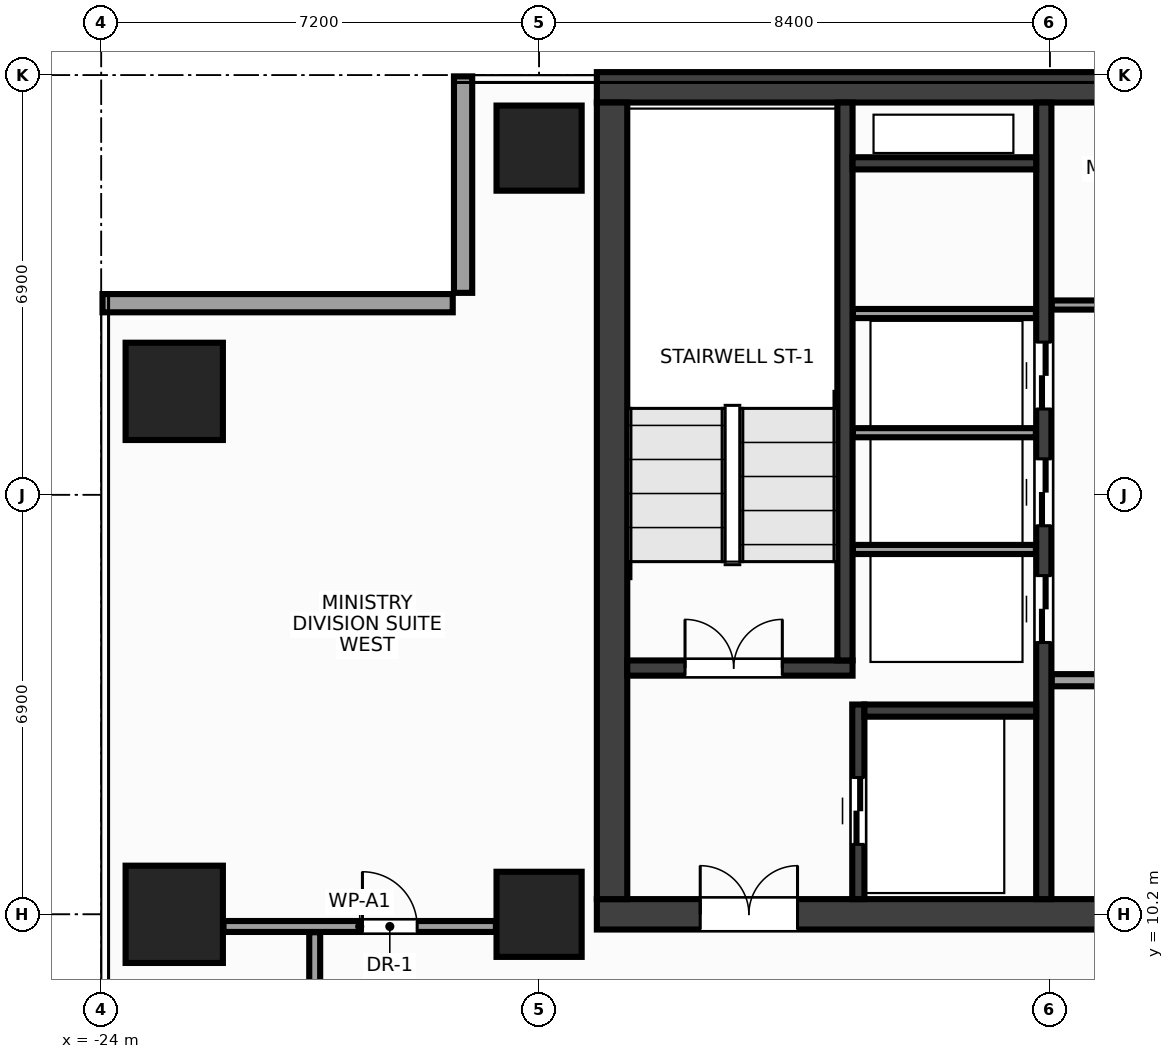
"""IFC4 building model, lengths in metres.
Left out: names, types, materials, properties, quantities, classifications, styles, units other than length and angle.
Written with IfcOpenShell. Run it as: python <this file> out.ifc"""

import sys

from ifc_helpers import new_model, si_unit, direction, frame, frame_2d, origin, origin_2d, place, context, subcontext, project, spatial, rectangle, extrude, source, transform, mapped, element, fill, save


model = new_model("IFC4")
c1 = context("Model", 3, precision=1e-05, world=origin(), true_north=direction((0.0, 1.0)))
c2 = subcontext(c1, "Body", "Model", "MODEL_VIEW")
j1 = project(units=[si_unit("LENGTHUNIT", "METRE"), si_unit("PLANEANGLEUNIT", "RADIAN")], contexts=[c1])
p1 = place(None, origin())
s1 = spatial("IfcSite", under=j1, at=p1, CompositionType="ELEMENT")
p2 = place(p1, origin())
s2 = spatial("IfcBuilding", under=s1, at=p2, CompositionType="ELEMENT")
p3 = place(p2, frame((0.0, 0.0, 225.2)))
s3 = spatial("IfcBuildingStorey", under=s2, at=p3, CompositionType="ELEMENT", Elevation=225.2)
m1 = source(origin(), c2, "Body", "SweptSolid", [
    extrude(rectangle(XDim=31.7, YDim=0.5, at=frame_2d((15.85, 0.0))), origin(), (0.0, 0.0, 1.0), 3.6),
])
p4 = place(p3, frame((-15.85, 23.8, 0.0), z_axis=(0.0, 0.0, 1.0), x_axis=(1.0, 0.0, 0.0)))
e1 = element("IfcWall", 1, at=p4, inside=s3, PredefinedType="SHEAR", context=c2, shape_type="MappedRepresentation", body=[
    mapped(m1, transform((0.0, 0.0, 0.0), x_axis=(1.0, 0.0, 0.0), y_axis=(0.0, 1.0, 0.0), z_axis=(0.0, 0.0, 1.0), scale=1.0)),
])
p5 = place(p3, frame((-15.85, 10.2, 0.0), z_axis=(0.0, 0.0, 1.0), x_axis=(1.0, 0.0, 0.0)))
e2 = element("IfcWall", 2, at=p5, inside=s3, PredefinedType="SHEAR", context=c2, shape_type="MappedRepresentation", body=[
    mapped(m1, transform((0.0, 0.0, 0.0), x_axis=(1.0, 0.0, 0.0), y_axis=(0.0, 1.0, 0.0), z_axis=(0.0, 0.0, 1.0), scale=1.0)),
])
p6 = place(p5, frame((1.7, 0.0, 0.0)))
e3 = element("IfcOpeningElement", 3, at=p6, cuts=e2, PredefinedType="OPENING", context=c2, shape_type="SweptSolid", body=[
    extrude(rectangle(XDim=1.6, YDim=2.15, at=frame_2d((0.8, 1.075))), frame((0.0, 0.262, 0.0), z_axis=(0.0, -1.0, 0.0), x_axis=(1.0, 0.0, 0.0)), (0.0, 0.0, 1.0), 0.524),
])
p7 = place(p5, frame((28.4, 0.0, 0.0)))
e4 = element("IfcOpeningElement", 4, at=p7, cuts=e2, PredefinedType="OPENING", context=c2, shape_type="SweptSolid", body=[
    extrude(rectangle(XDim=1.6, YDim=2.15, at=frame_2d((0.8, 1.075))), frame((0.0, 0.262, 0.0), z_axis=(0.0, -1.0, 0.0), x_axis=(1.0, 0.0, 0.0)), (0.0, 0.0, 1.0), 0.524),
])
p8 = place(p5, frame((15.1, 0.0, 0.0)))
e5 = element("IfcOpeningElement", 5, at=p8, cuts=e2, PredefinedType="OPENING", context=c2, shape_type="SweptSolid", body=[
    extrude(rectangle(XDim=1.5, YDim=2.2, at=frame_2d((0.75, 1.1))), frame((0.0, 0.262, 0.0), z_axis=(0.0, -1.0, 0.0), x_axis=(1.0, 0.0, 0.0)), (0.0, 0.0, 1.0), 0.524),
])
m2 = source(origin(), c2, "Body", "SweptSolid", [
    extrude(rectangle(XDim=13.1, YDim=0.5, at=frame_2d((6.55, 0.0))), origin(), (0.0, 0.0, 1.0), 3.6),
])
p9 = place(p3, frame((-15.6, 10.45, 0.0), z_axis=(0.0, 0.0, 1.0), x_axis=(0.0, 1.0, 0.0)))
e6 = element("IfcWall", 6, at=p9, inside=s3, PredefinedType="SHEAR", context=c2, shape_type="MappedRepresentation", body=[
    mapped(m2, transform((0.0, 0.0, 0.0), x_axis=(1.0, 0.0, 0.0), y_axis=(0.0, 1.0, 0.0), z_axis=(0.0, 0.0, 1.0), scale=1.0)),
])
m3 = source(origin(), c2, "Body", "SweptSolid", [
    extrude(rectangle(XDim=13.1, YDim=0.25, at=frame_2d((6.55, 0.0))), origin(), (0.0, 0.0, 1.0), 3.6),
])
p10 = place(p3, frame((-8.5, 10.45, 0.0), z_axis=(0.0, 0.0, 1.0), x_axis=(0.0, 1.0, 0.0)))
e7 = element("IfcWall", 7, at=p10, inside=s3, PredefinedType="SHEAR", context=c2, shape_type="MappedRepresentation", body=[
    mapped(m3, transform((0.0, 0.0, 0.0), x_axis=(1.0, 0.0, 0.0), y_axis=(0.0, 1.0, 0.0), z_axis=(0.0, 0.0, 1.0), scale=1.0)),
])
p11 = place(p10, frame((4.22, 0.0, 0.0)))
e8 = element("IfcOpeningElement", 8, at=p11, cuts=e7, PredefinedType="OPENING", context=c2, shape_type="SweptSolid", body=[
    extrude(rectangle(XDim=1.1, YDim=2.15, at=frame_2d((0.55, 1.075))), frame((0.0, 0.137, 0.0), z_axis=(0.0, -1.0, 0.0), x_axis=(1.0, 0.0, 0.0)), (0.0, 0.0, 1.0), 0.274),
])
p12 = place(p10, frame((6.14, 0.0, 0.0)))
e9 = element("IfcOpeningElement", 9, at=p12, cuts=e7, PredefinedType="OPENING", context=c2, shape_type="SweptSolid", body=[
    extrude(rectangle(XDim=1.1, YDim=2.15, at=frame_2d((0.55, 1.075))), frame((0.0, 0.137, 0.0), z_axis=(0.0, -1.0, 0.0), x_axis=(1.0, 0.0, 0.0)), (0.0, 0.0, 1.0), 0.274),
])
p13 = place(p10, frame((8.06, 0.0, 0.0)))
e10 = element("IfcOpeningElement", 10, at=p13, cuts=e7, PredefinedType="OPENING", context=c2, shape_type="SweptSolid", body=[
    extrude(rectangle(XDim=1.1, YDim=2.15, at=frame_2d((0.55, 1.075))), frame((0.0, 0.137, 0.0), z_axis=(0.0, -1.0, 0.0), x_axis=(1.0, 0.0, 0.0)), (0.0, 0.0, 1.0), 0.274),
])
m4 = source(origin(), c2, "Body", "SweptSolid", [
    extrude(rectangle(XDim=3.705, YDim=0.25, at=frame_2d((1.853, 0.0))), origin(), (0.0, 0.0, 1.0), 3.6),
])
p14 = place(p3, frame((-15.35, 14.25, 0.0), z_axis=(0.0, 0.0, 1.0), x_axis=(1.0, 0.0, 0.0)))
e11 = element("IfcWall", 11, at=p14, inside=s3, PredefinedType="SHEAR", context=c2, shape_type="MappedRepresentation", body=[
    mapped(m4, transform((0.0, 0.0, 0.0), x_axis=(1.0, 0.0, 0.0), y_axis=(0.0, 1.0, 0.0), z_axis=(0.0, 0.0, 1.0), scale=1.0)),
])
p15 = place(p14, frame((0.95, 0.0, 0.0)))
e12 = element("IfcOpeningElement", 12, at=p15, cuts=e11, PredefinedType="OPENING", context=c2, shape_type="SweptSolid", body=[
    extrude(rectangle(XDim=1.6, YDim=2.15, at=frame_2d((0.8, 1.075))), frame((0.0, 0.137, 0.0), z_axis=(0.0, -1.0, 0.0), x_axis=(1.0, 0.0, 0.0)), (0.0, 0.0, 1.0), 0.274),
])
m5 = source(origin(), c2, "Body", "SweptSolid", [
    extrude(rectangle(XDim=9.175, YDim=0.25, at=frame_2d((4.587, 0.0))), origin(), (0.0, 0.0, 1.0), 3.6),
])
p16 = place(p3, frame((-11.77, 14.375, 0.0), z_axis=(0.0, 0.0, 1.0), x_axis=(0.0, 1.0, 0.0)))
e13 = element("IfcWall", 13, at=p16, inside=s3, PredefinedType="SHEAR", context=c2, shape_type="MappedRepresentation", body=[
    mapped(m5, transform((0.0, 0.0, 0.0), x_axis=(1.0, 0.0, 0.0), y_axis=(0.0, 1.0, 0.0), z_axis=(0.0, 0.0, 1.0), scale=1.0)),
])
m6 = source(origin(), c2, "Body", "SweptSolid", [
    extrude(rectangle(XDim=3.2, YDim=0.2, at=frame_2d((1.6, 0.0))), origin(), (0.0, 0.0, 1.0), 3.6),
])
p17 = place(p3, frame((-11.55, 10.45, 0.0), z_axis=(0.0, 0.0, 1.0), x_axis=(0.0, 1.0, 0.0)))
e14 = element("IfcWall", 14, at=p17, inside=s3, PredefinedType="SHEAR", context=c2, shape_type="MappedRepresentation", body=[
    mapped(m6, transform((0.0, 0.0, 0.0), x_axis=(1.0, 0.0, 0.0), y_axis=(0.0, 1.0, 0.0), z_axis=(0.0, 0.0, 1.0), scale=1.0)),
])
p18 = place(p17, frame((0.9, 0.0, 0.0)))
e15 = element("IfcOpeningElement", 15, at=p18, cuts=e14, PredefinedType="OPENING", context=c2, shape_type="SweptSolid", body=[
    extrude(rectangle(XDim=1.1, YDim=2.15, at=frame_2d((0.55, 1.075))), frame((0.0, 0.112, 0.0), z_axis=(0.0, -1.0, 0.0), x_axis=(1.0, 0.0, 0.0)), (0.0, 0.0, 1.0), 0.224),
])
m7 = source(origin(), c2, "Body", "SweptSolid", [
    extrude(rectangle(XDim=2.825, YDim=0.2, at=frame_2d((1.413, 0.0))), origin(), (0.0, 0.0, 1.0), 3.6),
])
p19 = place(p3, frame((-11.45, 13.55, 0.0), z_axis=(0.0, 0.0, 1.0), x_axis=(1.0, 0.0, 0.0)))
e16 = element("IfcWall", 16, at=p19, inside=s3, PredefinedType="SHEAR", context=c2, shape_type="MappedRepresentation", body=[
    mapped(m7, transform((0.0, 0.0, 0.0), x_axis=(1.0, 0.0, 0.0), y_axis=(0.0, 1.0, 0.0), z_axis=(0.0, 0.0, 1.0), scale=1.0)),
])
m8 = source(origin(), c2, "Body", "SweptSolid", [
    extrude(rectangle(XDim=3.02, YDim=0.2, at=frame_2d((1.51, 0.0))), origin(), (0.0, 0.0, 1.0), 3.6),
])
p20 = place(p3, frame((-11.645, 22.55, 0.0), z_axis=(0.0, 0.0, 1.0), x_axis=(1.0, 0.0, 0.0)))
e17 = element("IfcWall", 17, at=p20, inside=s3, PredefinedType="SHEAR", context=c2, shape_type="MappedRepresentation", body=[
    mapped(m8, transform((0.0, 0.0, 0.0), x_axis=(1.0, 0.0, 0.0), y_axis=(0.0, 1.0, 0.0), z_axis=(0.0, 0.0, 1.0), scale=1.0)),
])
m9 = source(origin(), c2, "Body", "SweptSolid", [
    extrude(rectangle(XDim=1.4, YDim=1.4, at=origin_2d()), origin(), (0.0, 0.0, 1.0), 3.6),
])
for number, where, z_axis, x_axis in (
    (18, (-16.8, 10.2, 0.0), (0.0, 0.0, 1.0), (1.0, 0.0, 0.0)),
    (19, (-16.8, 22.8, 0.0), (0.0, 0.0, 1.0), (1.0, 0.0, 0.0)),
):
    element("IfcColumn", number, at=place(p3, frame(where, z_axis=z_axis, x_axis=x_axis)), inside=s3, PredefinedType="COLUMN", context=c2, shape_type="MappedRepresentation", body=[
        mapped(m9, transform((0.0, 0.0, 0.0), x_axis=(1.0, 0.0, 0.0), y_axis=(0.0, 1.0, 0.0), z_axis=(0.0, 0.0, 1.0), scale=1.0)),
    ])
m10 = source(origin(), c2, "Body", "SweptSolid", [
    extrude(rectangle(XDim=1.6, YDim=1.6, at=origin_2d()), origin(), (0.0, 0.0, 1.0), 3.6),
])
for number, where, z_axis, x_axis in (
    (20, (-22.8, 10.2, 0.0), (0.0, 0.0, 1.0), (1.0, 0.0, 0.0)),
    (21, (-22.8, 18.8, 0.0), (0.0, 0.0, 1.0), (1.0, 0.0, 0.0)),
):
    element("IfcColumn", number, at=place(p3, frame(where, z_axis=z_axis, x_axis=x_axis)), inside=s3, PredefinedType="COLUMN", context=c2, shape_type="MappedRepresentation", body=[
        mapped(m10, transform((0.0, 0.0, 0.0), x_axis=(1.0, 0.0, 0.0), y_axis=(0.0, 1.0, 0.0), z_axis=(0.0, 0.0, 1.0), scale=1.0)),
    ])
m11 = source(origin(), c2, "Body", "SweptSolid", [
    extrude(rectangle(XDim=3.56, YDim=0.3, at=frame_2d((1.78, 0.0))), origin(), (0.0, 0.0, 1.0), 2.66),
])
p21 = place(p3, frame((-18.05, 23.98, 0.0), z_axis=(0.0, 0.0, 1.0), x_axis=(0.0, -1.0, 0.0)))
e22 = element("IfcWall", 22, at=p21, inside=s3, PredefinedType="STANDARD", context=c2, shape_type="MappedRepresentation", body=[
    mapped(m11, transform((0.0, 0.0, 0.0), x_axis=(1.0, 0.0, 0.0), y_axis=(0.0, 1.0, 0.0), z_axis=(0.0, 0.0, 1.0), scale=1.0)),
])
m12 = source(origin(), c2, "Body", "SweptSolid", [
    extrude(rectangle(XDim=5.76, YDim=0.3, at=frame_2d((2.88, 0.0))), origin(), (0.0, 0.0, 1.0), 2.66),
])
p22 = place(p3, frame((-18.22, 20.25, 0.0), z_axis=(0.0, 0.0, 1.0), x_axis=(-1.0, 0.0, 0.0)))
e23 = element("IfcWall", 23, at=p22, inside=s3, PredefinedType="STANDARD", context=c2, shape_type="MappedRepresentation", body=[
    mapped(m12, transform((0.0, 0.0, 0.0), x_axis=(1.0, 0.0, 0.0), y_axis=(0.0, 1.0, 0.0), z_axis=(0.0, 0.0, 1.0), scale=1.0)),
])
m13 = source(origin(), c2, "Body", "SweptSolid", [
    extrude(rectangle(XDim=3.01, YDim=0.15, at=frame_2d((1.505, 0.0))), origin(), (0.0, 0.0, 1.0), 3.28),
])
for number, where, z_axis, x_axis in (
    (24, (-11.64, 16.2, 0.0), (0.0, 0.0, 1.0), (1.0, 0.0, 0.0)),
    (25, (-11.64, 18.12, 0.0), (0.0, 0.0, 1.0), (1.0, 0.0, 0.0)),
    (26, (-11.64, 20.08, 0.0), (0.0, 0.0, 1.0), (1.0, 0.0, 0.0)),
):
    element("IfcWall", number, at=place(p3, frame(where, z_axis=z_axis, x_axis=x_axis)), inside=s3, PredefinedType="PARTITIONING", context=c2, shape_type="MappedRepresentation", body=[
        mapped(m13, transform((0.0, 0.0, 0.0), x_axis=(1.0, 0.0, 0.0), y_axis=(0.0, 1.0, 0.0), z_axis=(0.0, 0.0, 1.0), scale=1.0)),
    ])
m14 = source(origin(), c2, "Body", "SweptSolid", [
    extrude(rectangle(XDim=7.07, YDim=0.2, at=frame_2d((3.535, 0.0))), origin(), (0.0, 0.0, 1.0), 3.28),
])
p23 = place(p3, frame((-8.37, 14.05, 0.0), z_axis=(0.0, 0.0, 1.0), x_axis=(1.0, 0.0, 0.0)))
e27 = element("IfcWall", 27, at=p23, inside=s3, PredefinedType="PARTITIONING", context=c2, shape_type="MappedRepresentation", body=[
    mapped(m14, transform((0.0, 0.0, 0.0), x_axis=(1.0, 0.0, 0.0), y_axis=(0.0, 1.0, 0.0), z_axis=(0.0, 0.0, 1.0), scale=1.0)),
])
p24 = place(p23, frame((1.06, 0.0, 0.0)))
e28 = element("IfcOpeningElement", 28, at=p24, cuts=e27, PredefinedType="OPENING", context=c2, shape_type="SweptSolid", body=[
    extrude(rectangle(XDim=0.9, YDim=2.15, at=frame_2d((0.45, 1.075))), frame((0.0, 0.112, 0.0), z_axis=(0.0, -1.0, 0.0), x_axis=(1.0, 0.0, 0.0)), (0.0, 0.0, 1.0), 0.224),
])
p25 = place(p23, frame((4.51, 0.0, 0.0)))
e29 = element("IfcOpeningElement", 29, at=p25, cuts=e27, PredefinedType="OPENING", context=c2, shape_type="SweptSolid", body=[
    extrude(rectangle(XDim=0.9, YDim=2.15, at=frame_2d((0.45, 1.075))), frame((0.0, 0.112, 0.0), z_axis=(0.0, -1.0, 0.0), x_axis=(1.0, 0.0, 0.0)), (0.0, 0.0, 1.0), 0.224),
])
m15 = source(origin(), c2, "Body", "SweptSolid", [
    extrude(rectangle(XDim=14.59, YDim=0.15, at=frame_2d((7.295, 0.0))), origin(), (0.0, 0.0, 1.0), 3.28),
])
p26 = place(p3, frame((-8.37, 20.22, 0.0), z_axis=(0.0, 0.0, 1.0), x_axis=(1.0, 0.0, 0.0)))
e30 = element("IfcWall", 30, at=p26, inside=s3, PredefinedType="PARTITIONING", context=c2, shape_type="MappedRepresentation", body=[
    mapped(m15, transform((0.0, 0.0, 0.0), x_axis=(1.0, 0.0, 0.0), y_axis=(0.0, 1.0, 0.0), z_axis=(0.0, 0.0, 1.0), scale=1.0)),
])
p27 = place(p26, frame((0.86, 0.0, 0.0)))
e31 = element("IfcOpeningElement", 31, at=p27, cuts=e30, PredefinedType="OPENING", context=c2, shape_type="SweptSolid", body=[
    extrude(rectangle(XDim=0.9, YDim=2.15, at=frame_2d((0.45, 1.075))), frame((0.0, 0.087, 0.0), z_axis=(0.0, -1.0, 0.0), x_axis=(1.0, 0.0, 0.0)), (0.0, 0.0, 1.0), 0.174),
])
p28 = place(p26, frame((3.47, 0.0, 0.0)))
e32 = element("IfcOpeningElement", 32, at=p28, cuts=e30, PredefinedType="OPENING", context=c2, shape_type="SweptSolid", body=[
    extrude(rectangle(XDim=0.9, YDim=2.15, at=frame_2d((0.45, 1.075))), frame((0.0, 0.087, 0.0), z_axis=(0.0, -1.0, 0.0), x_axis=(1.0, 0.0, 0.0)), (0.0, 0.0, 1.0), 0.174),
])
p29 = place(p26, frame((6.17, 0.0, 0.0)))
e33 = element("IfcOpeningElement", 33, at=p29, cuts=e30, PredefinedType="OPENING", context=c2, shape_type="SweptSolid", body=[
    extrude(rectangle(XDim=0.9, YDim=2.15, at=frame_2d((0.45, 1.075))), frame((0.0, 0.087, 0.0), z_axis=(0.0, -1.0, 0.0), x_axis=(1.0, 0.0, 0.0)), (0.0, 0.0, 1.0), 0.174),
])
p30 = place(p26, frame((9.07, 0.0, 0.0)))
e34 = element("IfcOpeningElement", 34, at=p30, cuts=e30, PredefinedType="OPENING", context=c2, shape_type="SweptSolid", body=[
    extrude(rectangle(XDim=0.9, YDim=2.15, at=frame_2d((0.45, 1.075))), frame((0.0, 0.087, 0.0), z_axis=(0.0, -1.0, 0.0), x_axis=(1.0, 0.0, 0.0)), (0.0, 0.0, 1.0), 0.174),
])
p31 = place(p26, frame((12.32, 0.0, 0.0)))
e35 = element("IfcOpeningElement", 35, at=p31, cuts=e30, PredefinedType="OPENING", context=c2, shape_type="SweptSolid", body=[
    extrude(rectangle(XDim=0.9, YDim=2.15, at=frame_2d((0.45, 1.075))), frame((0.0, 0.087, 0.0), z_axis=(0.0, -1.0, 0.0), x_axis=(1.0, 0.0, 0.0)), (0.0, 0.0, 1.0), 0.174),
])
m16 = source(origin(), c2, "Body", "SweptSolid", [
    extrude(rectangle(XDim=4.48, YDim=0.18, at=frame_2d((2.24, 0.0))), origin(), (0.0, 0.0, 1.0), 2.815),
])
p32 = place(p3, frame((-21.99, 10.0, 0.0), z_axis=(0.0, 0.0, 1.0), x_axis=(1.0, 0.0, 0.0)))
e36 = element("IfcWall", 36, at=p32, inside=s3, PredefinedType="PARTITIONING", context=c2, shape_type="MappedRepresentation", body=[
    mapped(m16, transform((0.0, 0.0, 0.0), x_axis=(1.0, 0.0, 0.0), y_axis=(0.0, 1.0, 0.0), z_axis=(0.0, 0.0, 1.0), scale=1.0)),
])
p33 = place(p32, frame((2.285, 0.0, 0.0)))
e37 = element("IfcOpeningElement", 37, at=p33, cuts=e36, PredefinedType="OPENING", context=c2, shape_type="SweptSolid", body=[
    extrude(rectangle(XDim=0.9, YDim=2.15, at=frame_2d((0.45, 1.075))), frame((0.0, 0.102, 0.0), z_axis=(0.0, -1.0, 0.0), x_axis=(1.0, 0.0, 0.0)), (0.0, 0.0, 1.0), 0.204),
])
m17 = source(origin(), c2, "Body", "SweptSolid", [
    extrude(rectangle(XDim=2.35, YDim=0.18, at=frame_2d((1.175, 0.0))), origin(), (0.0, 0.0, 1.0), 3.28),
])
p34 = place(p3, frame((-20.49, 7.555, 0.0), z_axis=(0.0, 0.0, 1.0), x_axis=(0.0, 1.0, 0.0)))
e38 = element("IfcWall", 38, at=p34, inside=s3, PredefinedType="PARTITIONING", context=c2, shape_type="MappedRepresentation", body=[
    mapped(m17, transform((0.0, 0.0, 0.0), x_axis=(1.0, 0.0, 0.0), y_axis=(0.0, 1.0, 0.0), z_axis=(0.0, 0.0, 1.0), scale=1.0)),
])
m18 = source(origin(), c2, "Body", "SweptSolid", [
    extrude(rectangle(XDim=1.6, YDim=2.15, at=frame_2d((0.8, 1.075))), frame((0.0, 0.025, 0.0), z_axis=(0.0, -1.0, 0.0), x_axis=(1.0, 0.0, 0.0)), (0.0, 0.0, 1.0), 0.05),
])
p35 = place(p15, origin())
e39 = element("IfcDoor", 39, at=p35, inside=s3, OperationType="DOUBLE_DOOR_SINGLE_SWING", PredefinedType="DOOR", context=c2, shape_type="MappedRepresentation", body=[
    mapped(m18, transform((0.0, 0.0, 0.0), x_axis=(1.0, 0.0, 0.0), y_axis=(0.0, 1.0, 0.0), z_axis=(0.0, 0.0, 1.0), scale=1.0)),
])
fill(e12, e39)
p36 = place(p6, origin())
e40 = element("IfcDoor", 40, at=p36, inside=s3, OperationType="DOUBLE_DOOR_SINGLE_SWING", PredefinedType="DOOR", context=c2, shape_type="MappedRepresentation", body=[
    mapped(m18, transform((0.0, 0.0, 0.0), x_axis=(1.0, 0.0, 0.0), y_axis=(0.0, 1.0, 0.0), z_axis=(0.0, 0.0, 1.0), scale=1.0)),
])
fill(e3, e40)
m19 = source(origin(), c2, "Body", "SweptSolid", [
    extrude(rectangle(XDim=1.1, YDim=2.15, at=frame_2d((0.55, 1.075))), frame((0.0, 0.025, 0.0), z_axis=(0.0, -1.0, 0.0), x_axis=(1.0, 0.0, 0.0)), (0.0, 0.0, 1.0), 0.05),
])
p37 = place(p18, origin())
e41 = element("IfcDoor", 41, at=p37, inside=s3, OperationType="DOUBLE_DOOR_SLIDING", PredefinedType="DOOR", context=c2, shape_type="MappedRepresentation", body=[
    mapped(m19, transform((0.0, 0.0, 0.0), x_axis=(1.0, 0.0, 0.0), y_axis=(0.0, 1.0, 0.0), z_axis=(0.0, 0.0, 1.0), scale=1.0)),
])
fill(e15, e41)
p38 = place(p11, origin())
e42 = element("IfcDoor", 42, at=p38, inside=s3, OperationType="DOUBLE_DOOR_SLIDING", PredefinedType="DOOR", context=c2, shape_type="MappedRepresentation", body=[
    mapped(m19, transform((0.0, 0.0, 0.0), x_axis=(1.0, 0.0, 0.0), y_axis=(0.0, 1.0, 0.0), z_axis=(0.0, 0.0, 1.0), scale=1.0)),
])
fill(e8, e42)
p39 = place(p12, origin())
e43 = element("IfcDoor", 43, at=p39, inside=s3, OperationType="DOUBLE_DOOR_SLIDING", PredefinedType="DOOR", context=c2, shape_type="MappedRepresentation", body=[
    mapped(m19, transform((0.0, 0.0, 0.0), x_axis=(1.0, 0.0, 0.0), y_axis=(0.0, 1.0, 0.0), z_axis=(0.0, 0.0, 1.0), scale=1.0)),
])
fill(e9, e43)
p40 = place(p13, origin())
e44 = element("IfcDoor", 44, at=p40, inside=s3, OperationType="DOUBLE_DOOR_SLIDING", PredefinedType="DOOR", context=c2, shape_type="MappedRepresentation", body=[
    mapped(m19, transform((0.0, 0.0, 0.0), x_axis=(1.0, 0.0, 0.0), y_axis=(0.0, 1.0, 0.0), z_axis=(0.0, 0.0, 1.0), scale=1.0)),
])
fill(e10, e44)
m20 = source(origin(), c2, "Body", "SweptSolid", [
    extrude(rectangle(XDim=0.9, YDim=2.15, at=frame_2d((0.45, 1.075))), frame((0.0, 0.025, 0.0), z_axis=(0.0, -1.0, 0.0), x_axis=(1.0, 0.0, 0.0)), (0.0, 0.0, 1.0), 0.05),
])
p41 = place(p33, origin())
e45 = element("IfcDoor", 45, at=p41, inside=s3, OperationType="SINGLE_SWING_LEFT", PredefinedType="DOOR", context=c2, shape_type="MappedRepresentation", body=[
    mapped(m20, transform((0.0, 0.0, 0.0), x_axis=(1.0, 0.0, 0.0), y_axis=(0.0, 1.0, 0.0), z_axis=(0.0, 0.0, 1.0), scale=1.0)),
])
fill(e37, e45)
save(model, sys.argv[1])
